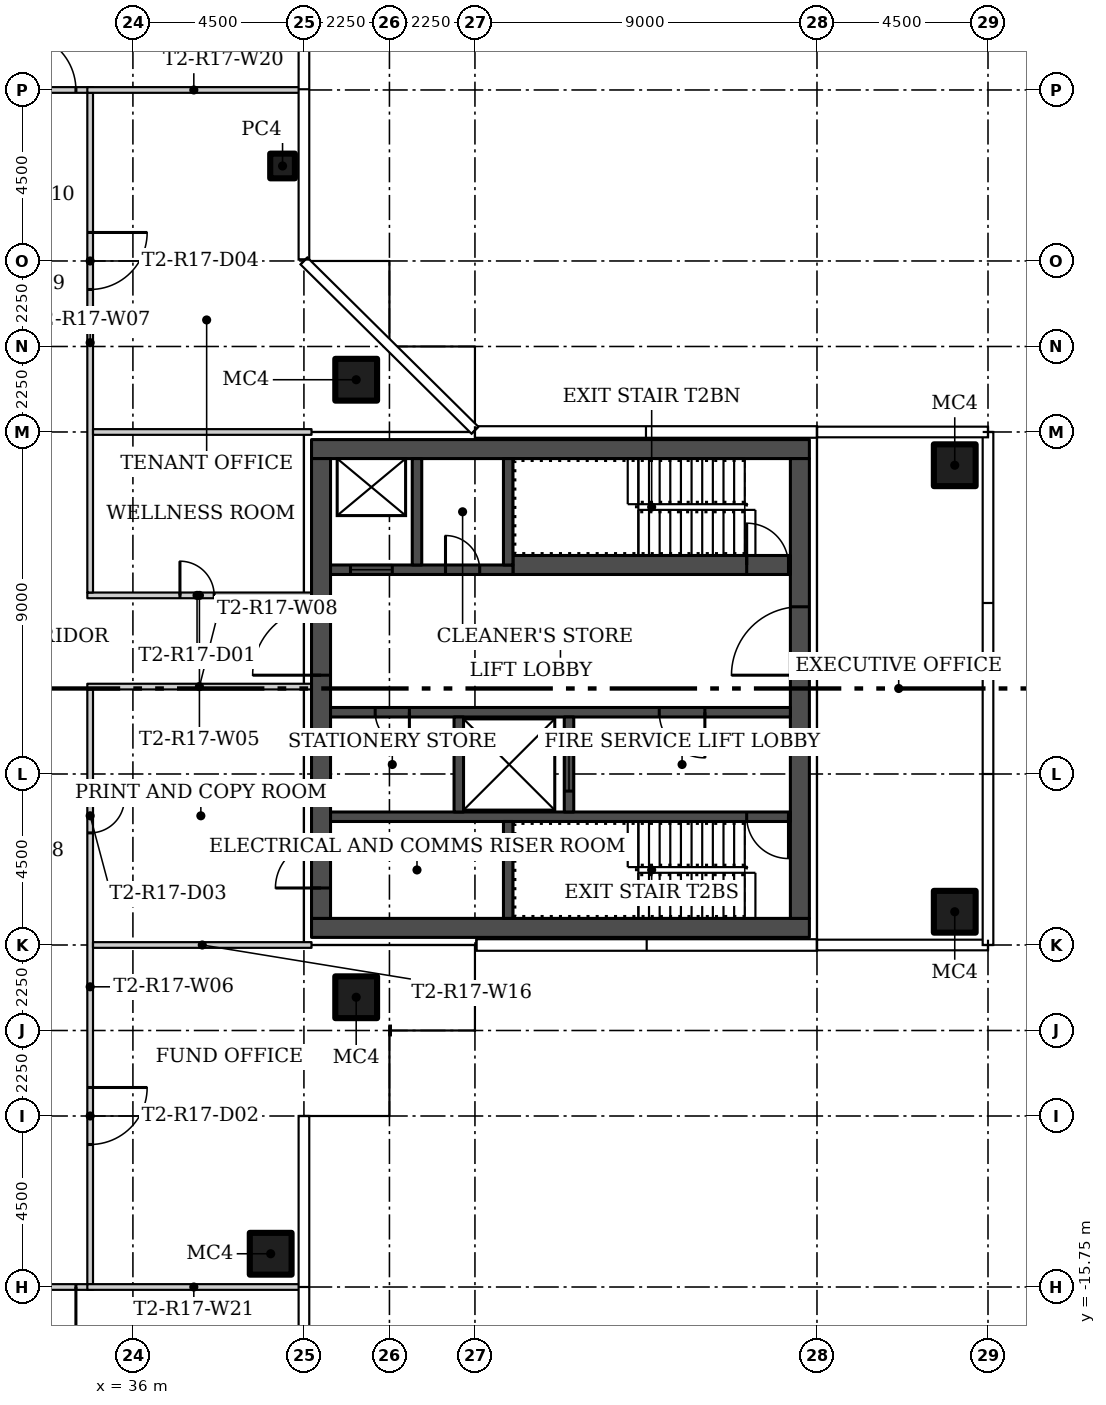
"""IFC4 building model, lengths in metres.
Left out: names, types, materials, properties, quantities, classifications, styles, units other than length and angle.
Written with IfcOpenShell. Run it as: python <this file> out.ifc"""

import sys

from ifc_helpers import new_model, si_unit, direction, frame, frame_2d, origin, origin_2d, place, context, subcontext, project, spatial, rectangle, hollow_rectangle, extrude, element, fill, save


model = new_model("IFC4")
c1 = context("Model", 3, precision=1e-05, world=origin(), true_north=direction((0.0, 1.0)))
c2 = subcontext(c1, "Body", "Model", "MODEL_VIEW")
j1 = project(units=[si_unit("LENGTHUNIT", "METRE"), si_unit("PLANEANGLEUNIT", "RADIAN")], contexts=[c1])
p1 = place(None, origin())
s1 = spatial("IfcSite", under=j1, at=p1, CompositionType="ELEMENT")
p2 = place(p1, origin())
s2 = spatial("IfcBuilding", under=s1, at=p2, CompositionType="ELEMENT")
p3 = place(p2, frame((0.0, 0.0, 150.6)))
s3 = spatial("IfcBuildingStorey", under=s2, at=p3, CompositionType="ELEMENT", Elevation=150.6)
for number, where in (
    (1, (41.875, 8.125, 0.0)),
    (2, (41.875, -8.125, 0.0)),
):
    element("IfcColumn", number, at=place(p3, frame(where)), inside=s3, PredefinedType="COLUMN", context=c2, shape_type="SweptSolid", body=[
        extrude(hollow_rectangle(XDim=1.1, YDim=1.1, WallThickness=0.04, at=origin_2d()), origin(), (0.0, 0.0, 1.0), 3.55),
    ])
p4 = place(p3, frame((39.938, 13.75, 0.0)))
e3 = element("IfcColumn", 3, at=p4, inside=s3, PredefinedType="COLUMN", context=c2, shape_type="SweptSolid", body=[
    extrude(hollow_rectangle(XDim=0.65, YDim=0.65, WallThickness=0.02, at=origin_2d()), origin(), (0.0, 0.0, 1.0), 3.55),
])
for number, where in (
    (4, (39.625, -14.875, 0.0)),
    (5, (57.625, -5.875, 0.0)),
    (6, (57.625, 5.875, 0.0)),
):
    element("IfcColumn", number, at=place(p3, frame(where)), inside=s3, PredefinedType="COLUMN", context=c2, shape_type="SweptSolid", body=[
        extrude(hollow_rectangle(XDim=1.1, YDim=1.1, WallThickness=0.04, at=origin_2d()), origin(), (0.0, 0.0, 1.0), 3.55),
    ])
p5 = place(p3, frame((34.8, 2.45, 0.0)))
e7 = element("IfcWall", 7, at=p5, inside=s3, PredefinedType="PARTITIONING", context=c2, shape_type="SweptSolid", body=[
    extrude(rectangle(XDim=5.9, YDim=0.15, at=frame_2d((2.95, 0.0))), origin(), (0.0, 0.0, 1.0), 3.55),
])
p6 = place(p5, frame((2.438, 0.0, 0.0)))
e8 = element("IfcOpeningElement", 8, at=p6, cuts=e7, PredefinedType="OPENING", context=c2, shape_type="SweptSolid", body=[
    extrude(rectangle(XDim=0.9, YDim=2.1, at=frame_2d((0.45, 1.05))), frame((0.0, 0.085, 0.0), z_axis=(0.0, -1.0, 0.0), x_axis=(1.0, 0.0, 0.0)), (0.0, 0.0, 1.0), 0.17),
])
p7 = place(p3, frame((34.875, -0.025, 0.0), z_axis=(0.0, 0.0, 1.0), x_axis=(0.0, -1.0, 0.0)))
e9 = element("IfcWall", 9, at=p7, inside=s3, PredefinedType="PARTITIONING", context=c2, shape_type="SweptSolid", body=[
    extrude(rectangle(XDim=15.65, YDim=0.15, at=frame_2d((7.825, 0.0))), origin(), (0.0, 0.0, 1.0), 3.55),
])
p8 = place(p7, frame((10.475, 0.0, 0.0)))
e10 = element("IfcOpeningElement", 10, at=p8, cuts=e9, PredefinedType="OPENING", context=c2, shape_type="SweptSolid", body=[
    extrude(rectangle(XDim=1.5, YDim=2.1, at=frame_2d((0.75, 1.05))), frame((0.0, 0.085, 0.0), z_axis=(0.0, -1.0, 0.0), x_axis=(1.0, 0.0, 0.0)), (0.0, 0.0, 1.0), 0.17),
])
p9 = place(p7, frame((2.875, 0.0, 0.0)))
e11 = element("IfcOpeningElement", 11, at=p9, cuts=e9, PredefinedType="OPENING", context=c2, shape_type="SweptSolid", body=[
    extrude(rectangle(XDim=0.9, YDim=2.1, at=frame_2d((0.45, 1.05))), frame((0.0, 0.085, 0.0), z_axis=(0.0, -1.0, 0.0), x_axis=(1.0, 0.0, 0.0)), (0.0, 0.0, 1.0), 0.17),
])
p10 = place(p3, frame((34.875, 15.675, 0.0), z_axis=(0.0, 0.0, 1.0), x_axis=(0.0, -1.0, 0.0)))
e12 = element("IfcWall", 12, at=p10, inside=s3, PredefinedType="PARTITIONING", context=c2, shape_type="SweptSolid", body=[
    extrude(rectangle(XDim=13.15, YDim=0.15, at=frame_2d((6.575, 0.0))), origin(), (0.0, 0.0, 1.0), 3.55),
])
p11 = place(p10, frame((3.675, 0.0, 0.0)))
e13 = element("IfcOpeningElement", 13, at=p11, cuts=e12, PredefinedType="OPENING", context=c2, shape_type="SweptSolid", body=[
    extrude(rectangle(XDim=1.5, YDim=2.1, at=frame_2d((0.75, 1.05))), frame((0.0, 0.085, 0.0), z_axis=(0.0, -1.0, 0.0), x_axis=(1.0, 0.0, 0.0)), (0.0, 0.0, 1.0), 0.17),
])
p12 = place(p3, frame((40.7, 0.05, 0.0), z_axis=(0.0, 0.0, 1.0), x_axis=(-1.0, 0.0, 0.0)))
e14 = element("IfcWall", 14, at=p12, inside=s3, PredefinedType="PARTITIONING", context=c2, shape_type="SweptSolid", body=[
    extrude(rectangle(XDim=5.9, YDim=0.15, at=frame_2d((2.95, 0.0))), origin(), (0.0, 0.0, 1.0), 3.55),
])
p13 = place(p3, frame((32.55, 15.75, 0.0)))
e15 = element("IfcWall", 15, at=p13, inside=s3, PredefinedType="PARTITIONING", context=c2, shape_type="SweptSolid", body=[
    extrude(rectangle(XDim=2.4, YDim=0.15, at=frame_2d((1.2, 0.0))), origin(), (0.0, 0.0, 1.0), 3.55),
])
p14 = place(p13, frame((0.45, 0.0, 0.0)))
e16 = element("IfcOpeningElement", 16, at=p14, cuts=e15, PredefinedType="OPENING", context=c2, shape_type="SweptSolid", body=[
    extrude(rectangle(XDim=1.5, YDim=2.1, at=frame_2d((0.75, 1.05))), frame((0.0, 0.085, 0.0), z_axis=(0.0, -1.0, 0.0), x_axis=(1.0, 0.0, 0.0)), (0.0, 0.0, 1.0), 0.17),
])
p15 = place(p3, frame((34.95, -15.75, 0.0), z_axis=(0.0, 0.0, 1.0), x_axis=(-1.0, 0.0, 0.0)))
e17 = element("IfcWall", 17, at=p15, inside=s3, PredefinedType="PARTITIONING", context=c2, shape_type="SweptSolid", body=[
    extrude(rectangle(XDim=2.4, YDim=0.15, at=frame_2d((1.2, 0.0))), origin(), (0.0, 0.0, 1.0), 3.55),
])
p16 = place(p15, frame((0.45, 0.0, 0.0)))
e18 = element("IfcOpeningElement", 18, at=p16, cuts=e17, PredefinedType="OPENING", context=c2, shape_type="SweptSolid", body=[
    extrude(rectangle(XDim=1.5, YDim=2.1, at=frame_2d((0.75, 1.05))), frame((0.0, 0.085, 0.0), z_axis=(0.0, -1.0, 0.0), x_axis=(1.0, 0.0, 0.0)), (0.0, 0.0, 1.0), 0.17),
])
p17 = place(p3, frame((40.7, 6.75, 0.0), z_axis=(0.0, 0.0, 1.0), x_axis=(-1.0, 0.0, 0.0)))
e19 = element("IfcWall", 19, at=p17, inside=s3, PredefinedType="PARTITIONING", context=c2, shape_type="SweptSolid", body=[
    extrude(rectangle(XDim=5.75, YDim=0.15, at=frame_2d((2.875, 0.0))), origin(), (0.0, 0.0, 1.0), 3.55),
])
p18 = place(p3, frame((34.95, -6.75, 0.0)))
e20 = element("IfcWall", 20, at=p18, inside=s3, PredefinedType="PARTITIONING", context=c2, shape_type="SweptSolid", body=[
    extrude(rectangle(XDim=5.75, YDim=0.15, at=frame_2d((2.875, 0.0))), origin(), (0.0, 0.0, 1.0), 3.55),
])
p19 = place(p3, frame((40.405, 15.75, 0.0), z_axis=(0.0, 0.0, 1.0), x_axis=(-1.0, 0.0, 0.0)))
e21 = element("IfcWall", 21, at=p19, inside=s3, PredefinedType="PARTITIONING", context=c2, shape_type="SweptSolid", body=[
    extrude(rectangle(XDim=5.605, YDim=0.15, at=frame_2d((2.802, 0.0))), origin(), (0.0, 0.0, 1.0), 3.55),
])
p20 = place(p3, frame((34.8, -15.75, 0.0)))
e22 = element("IfcWall", 22, at=p20, inside=s3, PredefinedType="PARTITIONING", context=c2, shape_type="SweptSolid", body=[
    extrude(rectangle(XDim=5.605, YDim=0.15, at=frame_2d((2.802, 0.0))), origin(), (0.0, 0.0, 1.0), 3.55),
])
for number, where, z_axis, x_axis in (
    (23, (53.8, -6.3, 0.0), (0.0, 0.0, 1.0), (-1.0, 0.0, 0.0)),
    (24, (53.8, 6.3, 0.0), (0.0, 0.0, 1.0), (-1.0, 0.0, 0.0)),
):
    element("IfcWall", number, at=place(p3, frame(where, z_axis=z_axis, x_axis=x_axis)), inside=s3, PredefinedType="SHEAR", context=c2, shape_type="SweptSolid", body=[
        extrude(rectangle(XDim=13.1, YDim=0.5, at=frame_2d((6.55, 0.0))), origin(), (0.0, 0.0, 1.0), 3.55),
    ])
p21 = place(p3, frame((53.55, -6.05, 0.0), z_axis=(0.0, 0.0, 1.0), x_axis=(0.0, 1.0, 0.0)))
e25 = element("IfcWall", 25, at=p21, inside=s3, PredefinedType="SHEAR", context=c2, shape_type="SweptSolid", body=[
    extrude(rectangle(XDim=12.1, YDim=0.5, at=frame_2d((6.05, 0.0))), origin(), (0.0, 0.0, 1.0), 3.55),
])
p22 = place(p21, frame((6.4, 0.0, 0.0)))
e26 = element("IfcOpeningElement", 26, at=p22, cuts=e25, PredefinedType="OPENING", context=c2, shape_type="SweptSolid", body=[
    extrude(rectangle(XDim=1.8, YDim=2.4, at=frame_2d((0.9, 1.2))), frame((0.0, 0.26, 0.0), z_axis=(0.0, -1.0, 0.0), x_axis=(1.0, 0.0, 0.0)), (0.0, 0.0, 1.0), 0.52),
])
p23 = place(p3, frame((40.95, -6.05, 0.0), z_axis=(0.0, 0.0, 1.0), x_axis=(0.0, 1.0, 0.0)))
e27 = element("IfcWall", 27, at=p23, inside=s3, PredefinedType="SHEAR", context=c2, shape_type="SweptSolid", body=[
    extrude(rectangle(XDim=12.1, YDim=0.5, at=frame_2d((6.05, 0.0))), origin(), (0.0, 0.0, 1.0), 3.55),
])
p24 = place(p23, frame((0.8, 0.0, 0.0)))
e28 = element("IfcOpeningElement", 28, at=p24, cuts=e27, PredefinedType="OPENING", context=c2, shape_type="SweptSolid", body=[
    extrude(rectangle(XDim=1.2, YDim=2.1, at=frame_2d((0.6, 1.05))), frame((0.0, 0.26, 0.0), z_axis=(0.0, -1.0, 0.0), x_axis=(1.0, 0.0, 0.0)), (0.0, 0.0, 1.0), 0.52),
])
p25 = place(p23, frame((6.4, 0.0, 0.0)))
e29 = element("IfcOpeningElement", 29, at=p25, cuts=e27, PredefinedType="OPENING", context=c2, shape_type="SweptSolid", body=[
    extrude(rectangle(XDim=1.8, YDim=2.4, at=frame_2d((0.9, 1.2))), frame((0.0, 0.26, 0.0), z_axis=(0.0, -1.0, 0.0), x_axis=(1.0, 0.0, 0.0)), (0.0, 0.0, 1.0), 0.52),
])
p26 = place(p3, frame((53.3, -3.375, 0.0), z_axis=(0.0, 0.0, 1.0), x_axis=(-1.0, 0.0, 0.0)))
e30 = element("IfcWall", 30, at=p26, inside=s3, PredefinedType="SHEAR", context=c2, shape_type="SweptSolid", body=[
    extrude(rectangle(XDim=12.1, YDim=0.25, at=frame_2d((6.05, 0.0))), origin(), (0.0, 0.0, 1.0), 3.55),
])
p27 = place(p26, frame((0.05, 0.0, 0.0)))
e31 = element("IfcOpeningElement", 31, at=p27, cuts=e30, PredefinedType="OPENING", context=c2, shape_type="SweptSolid", body=[
    extrude(rectangle(XDim=1.1, YDim=2.1, at=frame_2d((0.55, 1.05))), frame((0.0, 0.135, 0.0), z_axis=(0.0, -1.0, 0.0), x_axis=(1.0, 0.0, 0.0)), (0.0, 0.0, 1.0), 0.27),
])
p28 = place(p3, frame((45.875, -6.05, 0.0), z_axis=(0.0, 0.0, 1.0), x_axis=(0.0, 1.0, 0.0)))
e32 = element("IfcWall", 32, at=p28, inside=s3, PredefinedType="SHEAR", context=c2, shape_type="SweptSolid", body=[
    extrude(rectangle(XDim=2.55, YDim=0.25, at=frame_2d((1.275, 0.0))), origin(), (0.0, 0.0, 1.0), 3.55),
])
p29 = place(p3, frame((53.3, -0.625, 0.0), z_axis=(0.0, 0.0, 1.0), x_axis=(-1.0, 0.0, 0.0)))
e33 = element("IfcWall", 33, at=p29, inside=s3, PredefinedType="SHEAR", context=c2, shape_type="SweptSolid", body=[
    extrude(rectangle(XDim=12.1, YDim=0.25, at=frame_2d((6.05, 0.0))), origin(), (0.0, 0.0, 1.0), 3.55),
])
p30 = place(p29, frame((2.25, 0.0, 0.0)))
e34 = element("IfcOpeningElement", 34, at=p30, cuts=e33, PredefinedType="OPENING", context=c2, shape_type="SweptSolid", body=[
    extrude(rectangle(XDim=1.2, YDim=2.1, at=frame_2d((0.6, 1.05))), frame((0.0, 0.135, 0.0), z_axis=(0.0, -1.0, 0.0), x_axis=(1.0, 0.0, 0.0)), (0.0, 0.0, 1.0), 0.27),
])
p31 = place(p29, frame((10.025, 0.0, 0.0)))
e35 = element("IfcOpeningElement", 35, at=p31, cuts=e33, PredefinedType="OPENING", context=c2, shape_type="SweptSolid", body=[
    extrude(rectangle(XDim=0.9, YDim=2.1, at=frame_2d((0.45, 1.05))), frame((0.0, 0.135, 0.0), z_axis=(0.0, -1.0, 0.0), x_axis=(1.0, 0.0, 0.0)), (0.0, 0.0, 1.0), 0.27),
])
p32 = place(p3, frame((47.475, -3.25, 0.0), z_axis=(0.0, 0.0, 1.0), x_axis=(0.0, 1.0, 0.0)))
e36 = element("IfcWall", 36, at=p32, inside=s3, PredefinedType="SHEAR", context=c2, shape_type="SweptSolid", body=[
    extrude(rectangle(XDim=2.5, YDim=0.25, at=frame_2d((1.25, 0.0))), origin(), (0.0, 0.0, 1.0), 3.55),
])
p33 = place(p32, frame((0.55, 0.0, 0.0)))
e37 = element("IfcOpeningElement", 37, at=p33, cuts=e36, PredefinedType="OPENING", context=c2, shape_type="SweptSolid", body=[
    extrude(rectangle(XDim=1.4, YDim=2.4, at=frame_2d((0.7, 1.2))), frame((0.0, 0.135, 0.0), z_axis=(0.0, -1.0, 0.0), x_axis=(1.0, 0.0, 0.0)), (0.0, 0.0, 1.0), 0.27),
])
p34 = place(p3, frame((44.575, -3.25, 0.0), z_axis=(0.0, 0.0, 1.0), x_axis=(0.0, 1.0, 0.0)))
e38 = element("IfcWall", 38, at=p34, inside=s3, PredefinedType="SHEAR", context=c2, shape_type="SweptSolid", body=[
    extrude(rectangle(XDim=2.5, YDim=0.25, at=frame_2d((1.25, 0.0))), origin(), (0.0, 0.0, 1.0), 3.55),
])
p35 = place(p3, frame((46.0, 3.25, 0.0)))
e39 = element("IfcWall", 39, at=p35, inside=s3, PredefinedType="SHEAR", context=c2, shape_type="SweptSolid", body=[
    extrude(rectangle(XDim=7.3, YDim=0.5, at=frame_2d((3.65, 0.0))), origin(), (0.0, 0.0, 1.0), 3.55),
])
p36 = place(p35, frame((6.15, 0.0, 0.0)))
e40 = element("IfcOpeningElement", 40, at=p36, cuts=e39, PredefinedType="OPENING", context=c2, shape_type="SweptSolid", body=[
    extrude(rectangle(XDim=1.1, YDim=2.1, at=frame_2d((0.55, 1.05))), frame((0.0, 0.26, 0.0), z_axis=(0.0, -1.0, 0.0), x_axis=(1.0, 0.0, 0.0)), (0.0, 0.0, 1.0), 0.52),
])
p37 = place(p3, frame((41.2, 3.125, 0.0)))
e41 = element("IfcWall", 41, at=p37, inside=s3, PredefinedType="SHEAR", context=c2, shape_type="SweptSolid", body=[
    extrude(rectangle(XDim=4.8, YDim=0.25, at=frame_2d((2.4, 0.0))), origin(), (0.0, 0.0, 1.0), 3.55),
])
p38 = place(p37, frame((0.525, 0.0, 0.0)))
e42 = element("IfcOpeningElement", 42, at=p38, cuts=e41, PredefinedType="OPENING", context=c2, shape_type="SweptSolid", body=[
    extrude(rectangle(XDim=1.1, YDim=2.1, at=frame_2d((0.55, 1.05))), frame((0.0, 0.135, 0.0), z_axis=(0.0, -1.0, 0.0), x_axis=(1.0, 0.0, 0.0)), (0.0, 0.0, 1.0), 0.27),
])
p39 = place(p37, frame((3.025, 0.0, 0.0)))
e43 = element("IfcOpeningElement", 43, at=p39, cuts=e41, PredefinedType="OPENING", context=c2, shape_type="SweptSolid", body=[
    extrude(rectangle(XDim=0.9, YDim=2.1, at=frame_2d((0.45, 1.05))), frame((0.0, 0.135, 0.0), z_axis=(0.0, -1.0, 0.0), x_axis=(1.0, 0.0, 0.0)), (0.0, 0.0, 1.0), 0.27),
])
for number, where, z_axis, x_axis in (
    (44, (45.875, 3.25, 0.0), (0.0, 0.0, 1.0), (0.0, 1.0, 0.0)),
    (45, (43.475, 3.25, 0.0), (0.0, 0.0, 1.0), (0.0, 1.0, 0.0)),
):
    element("IfcWall", number, at=place(p3, frame(where, z_axis=z_axis, x_axis=x_axis)), inside=s3, PredefinedType="SHEAR", context=c2, shape_type="SweptSolid", body=[
        extrude(rectangle(XDim=2.8, YDim=0.25, at=frame_2d((1.4, 0.0))), origin(), (0.0, 0.0, 1.0), 3.55),
    ])
p40 = place(p6, origin())
e46 = element("IfcDoor", 46, at=p40, inside=s3, OperationType="SINGLE_SWING_RIGHT", PredefinedType="DOOR", context=c2, shape_type="SweptSolid", body=[
    extrude(rectangle(XDim=0.9, YDim=2.1, at=frame_2d((0.45, 1.05))), frame((0.0, 0.025, 0.0), z_axis=(0.0, -1.0, 0.0), x_axis=(1.0, 0.0, 0.0)), (0.0, 0.0, 1.0), 0.05),
])
fill(e8, e46)
p41 = place(p8, origin())
e47 = element("IfcDoor", 47, at=p41, inside=s3, OperationType="DOUBLE_DOOR_SINGLE_SWING", PredefinedType="DOOR", context=c2, shape_type="SweptSolid", body=[
    extrude(rectangle(XDim=1.5, YDim=2.1, at=frame_2d((0.75, 1.05))), frame((0.0, 0.025, 0.0), z_axis=(0.0, -1.0, 0.0), x_axis=(1.0, 0.0, 0.0)), (0.0, 0.0, 1.0), 0.05),
])
fill(e10, e47)
p42 = place(p9, origin())
e48 = element("IfcDoor", 48, at=p42, inside=s3, OperationType="SINGLE_SWING_RIGHT", PredefinedType="DOOR", context=c2, shape_type="SweptSolid", body=[
    extrude(rectangle(XDim=0.9, YDim=2.1, at=frame_2d((0.45, 1.05))), frame((0.0, 0.025, 0.0), z_axis=(0.0, -1.0, 0.0), x_axis=(1.0, 0.0, 0.0)), (0.0, 0.0, 1.0), 0.05),
])
fill(e11, e48)
p43 = place(p11, origin())
e49 = element("IfcDoor", 49, at=p43, inside=s3, OperationType="DOUBLE_DOOR_SINGLE_SWING", PredefinedType="DOOR", context=c2, shape_type="SweptSolid", body=[
    extrude(rectangle(XDim=1.5, YDim=2.1, at=frame_2d((0.75, 1.05))), frame((0.0, 0.025, 0.0), z_axis=(0.0, -1.0, 0.0), x_axis=(1.0, 0.0, 0.0)), (0.0, 0.0, 1.0), 0.05),
])
fill(e13, e49)
p44 = place(p14, origin())
e50 = element("IfcDoor", 50, at=p44, inside=s3, OperationType="DOUBLE_DOOR_SINGLE_SWING", PredefinedType="DOOR", context=c2, shape_type="SweptSolid", body=[
    extrude(rectangle(XDim=1.5, YDim=2.1, at=frame_2d((0.75, 1.05))), frame((0.0, 0.025, 0.0), z_axis=(0.0, -1.0, 0.0), x_axis=(1.0, 0.0, 0.0)), (0.0, 0.0, 1.0), 0.05),
])
fill(e16, e50)
p45 = place(p16, origin())
e51 = element("IfcDoor", 51, at=p45, inside=s3, OperationType="DOUBLE_DOOR_SINGLE_SWING", PredefinedType="DOOR", context=c2, shape_type="SweptSolid", body=[
    extrude(rectangle(XDim=1.5, YDim=2.1, at=frame_2d((0.75, 1.05))), frame((0.0, 0.025, 0.0), z_axis=(0.0, -1.0, 0.0), x_axis=(1.0, 0.0, 0.0)), (0.0, 0.0, 1.0), 0.05),
])
fill(e18, e51)
p46 = place(p22, origin())
e52 = element("IfcDoor", 52, at=p46, inside=s3, OperationType="DOUBLE_DOOR_SINGLE_SWING", PredefinedType="DOOR", context=c2, shape_type="SweptSolid", body=[
    extrude(rectangle(XDim=1.8, YDim=2.4, at=frame_2d((0.9, 1.2))), frame((0.0, 0.025, 0.0), z_axis=(0.0, -1.0, 0.0), x_axis=(1.0, 0.0, 0.0)), (0.0, 0.0, 1.0), 0.05),
])
fill(e26, e52)
p47 = place(p24, origin())
e53 = element("IfcDoor", 53, at=p47, inside=s3, OperationType="SINGLE_SWING_LEFT", PredefinedType="DOOR", context=c2, shape_type="SweptSolid", body=[
    extrude(rectangle(XDim=1.2, YDim=2.1, at=frame_2d((0.6, 1.05))), frame((0.0, 0.025, 0.0), z_axis=(0.0, -1.0, 0.0), x_axis=(1.0, 0.0, 0.0)), (0.0, 0.0, 1.0), 0.05),
])
fill(e28, e53)
p48 = place(p25, origin())
e54 = element("IfcDoor", 54, at=p48, inside=s3, OperationType="DOUBLE_DOOR_SINGLE_SWING", PredefinedType="DOOR", context=c2, shape_type="SweptSolid", body=[
    extrude(rectangle(XDim=1.8, YDim=2.4, at=frame_2d((0.9, 1.2))), frame((0.0, 0.025, 0.0), z_axis=(0.0, -1.0, 0.0), x_axis=(1.0, 0.0, 0.0)), (0.0, 0.0, 1.0), 0.05),
])
fill(e29, e54)
p49 = place(p27, origin())
e55 = element("IfcDoor", 55, at=p49, inside=s3, OperationType="SINGLE_SWING_LEFT", PredefinedType="DOOR", context=c2, shape_type="SweptSolid", body=[
    extrude(rectangle(XDim=1.1, YDim=2.1, at=frame_2d((0.55, 1.05))), frame((0.0, 0.025, 0.0), z_axis=(0.0, -1.0, 0.0), x_axis=(1.0, 0.0, 0.0)), (0.0, 0.0, 1.0), 0.05),
])
fill(e31, e55)
p50 = place(p30, origin())
e56 = element("IfcDoor", 56, at=p50, inside=s3, OperationType="SINGLE_SWING_LEFT", PredefinedType="DOOR", context=c2, shape_type="SweptSolid", body=[
    extrude(rectangle(XDim=1.2, YDim=2.1, at=frame_2d((0.6, 1.05))), frame((0.0, 0.025, 0.0), z_axis=(0.0, -1.0, 0.0), x_axis=(1.0, 0.0, 0.0)), (0.0, 0.0, 1.0), 0.05),
])
fill(e34, e56)
p51 = place(p31, origin())
e57 = element("IfcDoor", 57, at=p51, inside=s3, OperationType="SINGLE_SWING_RIGHT", PredefinedType="DOOR", context=c2, shape_type="SweptSolid", body=[
    extrude(rectangle(XDim=0.9, YDim=2.1, at=frame_2d((0.45, 1.05))), frame((0.0, 0.025, 0.0), z_axis=(0.0, -1.0, 0.0), x_axis=(1.0, 0.0, 0.0)), (0.0, 0.0, 1.0), 0.05),
])
fill(e35, e57)
p52 = place(p33, origin())
e58 = element("IfcDoor", 58, at=p52, inside=s3, OperationType="SLIDING_TO_LEFT", PredefinedType="DOOR", context=c2, shape_type="SweptSolid", body=[
    extrude(rectangle(XDim=1.4, YDim=2.4, at=frame_2d((0.7, 1.2))), frame((0.0, 0.025, 0.0), z_axis=(0.0, -1.0, 0.0), x_axis=(1.0, 0.0, 0.0)), (0.0, 0.0, 1.0), 0.05),
])
fill(e37, e58)
p53 = place(p36, origin())
e59 = element("IfcDoor", 59, at=p53, inside=s3, OperationType="SINGLE_SWING_RIGHT", PredefinedType="DOOR", context=c2, shape_type="SweptSolid", body=[
    extrude(rectangle(XDim=1.1, YDim=2.1, at=frame_2d((0.55, 1.05))), frame((0.0, 0.025, 0.0), z_axis=(0.0, -1.0, 0.0), x_axis=(1.0, 0.0, 0.0)), (0.0, 0.0, 1.0), 0.05),
])
fill(e40, e59)
p54 = place(p38, origin())
e60 = element("IfcDoor", 60, at=p54, inside=s3, OperationType="SLIDING_TO_LEFT", PredefinedType="DOOR", context=c2, shape_type="SweptSolid", body=[
    extrude(rectangle(XDim=1.1, YDim=2.1, at=frame_2d((0.55, 1.05))), frame((0.0, 0.025, 0.0), z_axis=(0.0, -1.0, 0.0), x_axis=(1.0, 0.0, 0.0)), (0.0, 0.0, 1.0), 0.05),
])
fill(e42, e60)
p55 = place(p39, origin())
e61 = element("IfcDoor", 61, at=p55, inside=s3, OperationType="SINGLE_SWING_RIGHT", PredefinedType="DOOR", context=c2, shape_type="SweptSolid", body=[
    extrude(rectangle(XDim=0.9, YDim=2.1, at=frame_2d((0.45, 1.05))), frame((0.0, 0.025, 0.0), z_axis=(0.0, -1.0, 0.0), x_axis=(1.0, 0.0, 0.0)), (0.0, 0.0, 1.0), 0.05),
])
fill(e43, e61)
save(model, sys.argv[1])
